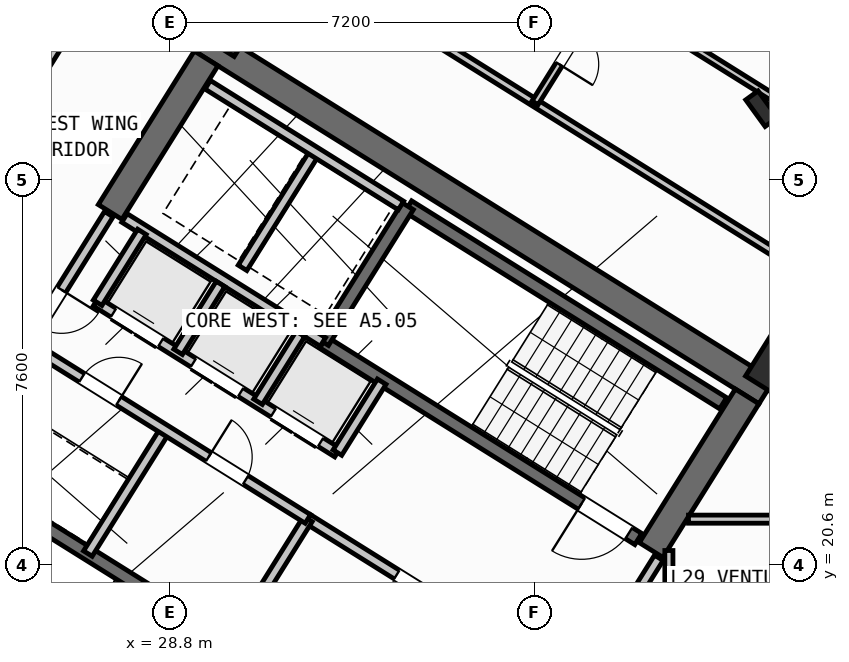
"""IFC4 building model, lengths in metres.
Left out: names, types, materials, properties, quantities, classifications, styles, units other than length and angle.
Written with IfcOpenShell. Run it as: python <this file> out.ifc"""

import sys

from ifc_helpers import new_model, si_unit, direction, frame, frame_2d, origin, origin_2d, place, context, subcontext, project, spatial, rectangle, hollow_rectangle, i_section, extrude, source, transform, mapped, element, fill, save


model = new_model("IFC4")
c1 = context("Model", 3, precision=1e-05, world=origin(), true_north=direction((0.0, 1.0)))
c2 = subcontext(c1, "Body", "Model", "MODEL_VIEW")
j1 = project(units=[si_unit("LENGTHUNIT", "METRE"), si_unit("PLANEANGLEUNIT", "RADIAN")], contexts=[c1])
p1 = place(None, origin())
s1 = spatial("IfcSite", under=j1, at=p1, CompositionType="ELEMENT")
p2 = place(p1, origin())
s2 = spatial("IfcBuilding", under=s1, at=p2, CompositionType="ELEMENT")
p3 = place(p2, frame((0.0, 0.0, 116.1)))
s3 = spatial("IfcBuildingStorey", under=s2, at=p3, CompositionType="ELEMENT", Elevation=116.1)
p4 = place(p3, frame((40.573, 24.01, 0.0), z_axis=(0.0, 0.0, 1.0), x_axis=(-0.848047359947, 0.529920442413, 0.0)))
e1 = element("IfcWall", 1, at=p4, inside=s3, PredefinedType="SHEAR", context=c2, shape_type="SweptSolid", body=[
    extrude(rectangle(XDim=13.14, YDim=0.55, at=frame_2d((6.57, 0.0))), origin(), (0.0, 0.0, 1.0), 3.35),
])
p5 = place(p3, frame((40.194, 23.922, 0.0), z_axis=(0.0, 0.0, 1.0), x_axis=(-0.529888438328, -0.848067357541, 0.0)))
e2 = element("IfcWall", 2, at=p5, inside=s3, PredefinedType="SHEAR", context=c2, shape_type="SweptSolid", body=[
    extrude(rectangle(XDim=3.575, YDim=0.55, at=frame_2d((1.788, 0.0))), origin(), (0.0, 0.0, 1.0), 3.35),
])
p6 = place(p3, frame((29.517, 30.594, 0.0), z_axis=(0.0, 0.0, 1.0), x_axis=(-0.529906864564, -0.848055844204, 0.0)))
e3 = element("IfcWall", 3, at=p6, inside=s3, PredefinedType="SHEAR", context=c2, shape_type="SweptSolid", body=[
    extrude(rectangle(XDim=3.575, YDim=0.55, at=frame_2d((1.788, 0.0))), origin(), (0.0, 0.0, 1.0), 3.35),
])
m1 = source(origin(), c2, "Body", "SweptSolid", [
    extrude(hollow_rectangle(XDim=0.9, YDim=0.9, WallThickness=0.036, at=origin_2d()), origin(), (0.0, 0.0, 1.0), 3.6),
])
for number, where, z_axis, x_axis in (
    (4, (40.783, 24.469, 0.0), (0.0, 0.0, 1.0), (-0.848, 0.53, 0.0)),
    (5, (29.928, 31.251, 0.0), (0.0, 0.0, 1.0), (-0.848, 0.53, 0.0)),
):
    element("IfcColumn", number, at=place(p3, frame(where, z_axis=z_axis, x_axis=x_axis)), inside=s3, PredefinedType="COLUMN", context=c2, shape_type="MappedRepresentation", body=[
        mapped(m1, transform((0.0, 0.0, 0.0), scale=1.0)),
    ])
m2 = source(origin(), c2, "Body", "SweptSolid", [
    extrude(i_section(OverallWidth=0.3, OverallDepth=0.65, WebThickness=0.016, FlangeThickness=0.031, at=origin_2d()), origin(), (0.0, 0.0, 1.0), 3.6),
])
p7 = place(p3, frame((40.479, 29.601, 0.0), z_axis=(0.0, 0.0, 1.0), x_axis=(0.809016994375, 0.587785252292, 0.0)))
e6 = element("IfcColumn", 6, at=p7, inside=s3, PredefinedType="COLUMN", context=c2, shape_type="MappedRepresentation", body=[
    mapped(m2, transform((0.0, 0.0, 0.0), scale=1.0)),
])
p8 = place(p3, frame((31.76, 12.183, 0.0), z_axis=(0.0, 0.0, 1.0), x_axis=(-0.848047074256, 0.529920899612, 0.0)))
e7 = element("IfcWall", 7, at=p8, inside=s3, PredefinedType="STANDARD", context=c2, shape_type="SweptSolid", body=[
    extrude(rectangle(XDim=30.652, YDim=0.32, at=frame_2d((15.326, 0.0))), origin(), (0.0, 0.0, 1.0), 3.35),
])
p9 = place(p8, frame((15.153, 0.0, 0.0)))
e8 = element("IfcOpeningElement", 8, at=p9, cuts=e7, PredefinedType="OPENING", context=c2, shape_type="SweptSolid", body=[
    extrude(rectangle(XDim=1.2, YDim=2.15, at=frame_2d((0.6, 1.075))), frame((0.0, 0.17, 0.0), z_axis=(0.0, -1.0, 0.0), x_axis=(1.0, 0.0, 0.0)), (0.0, 0.0, 1.0), 0.34),
])
p10 = place(p8, frame((2.002, 0.0, 0.8)))
e9 = element("IfcOpeningElement", 9, at=p10, cuts=e7, PredefinedType="OPENING", context=c2, shape_type="SweptSolid", body=[
    extrude(rectangle(XDim=2.1, YDim=1.55, at=frame_2d((1.05, 0.775))), frame((0.0, 0.17, 0.0), z_axis=(0.0, -1.0, 0.0), x_axis=(1.0, 0.0, 0.0)), (0.0, 0.0, 1.0), 0.34),
])
p11 = place(p8, frame((7.206, 0.0, 0.8)))
e10 = element("IfcOpeningElement", 10, at=p11, cuts=e7, PredefinedType="OPENING", context=c2, shape_type="SweptSolid", body=[
    extrude(rectangle(XDim=2.1, YDim=1.55, at=frame_2d((1.05, 0.775))), frame((0.0, 0.17, 0.0), z_axis=(0.0, -1.0, 0.0), x_axis=(1.0, 0.0, 0.0)), (0.0, 0.0, 1.0), 0.34),
])
p12 = place(p8, frame((12.648, 0.0, 1.0)))
e11 = element("IfcOpeningElement", 11, at=p12, cuts=e7, PredefinedType="OPENING", context=c2, shape_type="SweptSolid", body=[
    extrude(rectangle(XDim=0.9, YDim=1.25, at=frame_2d((0.45, 0.625))), frame((0.0, 0.17, 0.0), z_axis=(0.0, -1.0, 0.0), x_axis=(1.0, 0.0, 0.0)), (0.0, 0.0, 1.0), 0.34),
])
p13 = place(p8, frame((19.458, 0.0, 0.95)))
e12 = element("IfcOpeningElement", 12, at=p13, cuts=e7, PredefinedType="OPENING", context=c2, shape_type="SweptSolid", body=[
    extrude(rectangle(XDim=1.2, YDim=1.4, at=frame_2d((0.6, 0.7))), frame((0.0, 0.17, 0.0), z_axis=(0.0, -1.0, 0.0), x_axis=(1.0, 0.0, 0.0)), (0.0, 0.0, 1.0), 0.34),
])
p14 = place(p8, frame((21.858, 0.0, 0.95)))
e13 = element("IfcOpeningElement", 13, at=p14, cuts=e7, PredefinedType="OPENING", context=c2, shape_type="SweptSolid", body=[
    extrude(rectangle(XDim=1.2, YDim=1.4, at=frame_2d((0.6, 0.7))), frame((0.0, 0.17, 0.0), z_axis=(0.0, -1.0, 0.0), x_axis=(1.0, 0.0, 0.0)), (0.0, 0.0, 1.0), 0.34),
])
p15 = place(p8, frame((27.266, 0.0, 0.8)))
e14 = element("IfcOpeningElement", 14, at=p15, cuts=e7, PredefinedType="OPENING", context=c2, shape_type="SweptSolid", body=[
    extrude(rectangle(XDim=2.1, YDim=1.55, at=frame_2d((1.05, 0.775))), frame((0.0, 0.17, 0.0), z_axis=(0.0, -1.0, 0.0), x_axis=(1.0, 0.0, 0.0)), (0.0, 0.0, 1.0), 0.34),
])
p16 = place(p3, frame((31.28, 18.261, 0.0), z_axis=(0.0, 0.0, 1.0), x_axis=(-0.848051618787, 0.529913626805, 0.0)))
e15 = element("IfcWall", 15, at=p16, inside=s3, PredefinedType="SHEAR", context=c2, shape_type="SweptSolid", body=[
    extrude(rectangle(XDim=7.46, YDim=0.26, at=frame_2d((3.73, 0.0))), origin(), (0.0, 0.0, 1.0), 3.35),
])
p17 = place(p16, frame((0.36, 0.0, 0.0)))
e16 = element("IfcOpeningElement", 16, at=p17, cuts=e15, PredefinedType="OPENING", context=c2, shape_type="SweptSolid", body=[
    extrude(rectangle(XDim=0.86, YDim=2.05, at=frame_2d((0.43, 1.025))), frame((0.0, 0.14, 0.0), z_axis=(0.0, -1.0, 0.0), x_axis=(1.0, 0.0, 0.0)), (0.0, 0.0, 1.0), 0.28),
])
p18 = place(p3, frame((39.721, 23.788, 0.0), z_axis=(0.0, 0.0, 1.0), x_axis=(-0.848054434086, 0.529909121291, 0.0)))
e17 = element("IfcWall", 17, at=p18, inside=s3, PredefinedType="SHEAR", context=c2, shape_type="SweptSolid", body=[
    extrude(rectangle(XDim=7.33, YDim=0.26, at=frame_2d((3.665, 0.0))), origin(), (0.0, 0.0, 1.0), 3.35),
])
p19 = place(p3, frame((38.046, 21.108, 0.0), z_axis=(0.0, 0.0, 1.0), x_axis=(-0.848054434086, 0.529909121291, 0.0)))
e18 = element("IfcWall", 18, at=p19, inside=s3, PredefinedType="SHEAR", context=c2, shape_type="SweptSolid", body=[
    extrude(rectangle(XDim=7.33, YDim=0.26, at=frame_2d((3.665, 0.0))), origin(), (0.0, 0.0, 1.0), 3.35),
])
p20 = place(p19, frame((0.22, 0.0, 0.0)))
e19 = element("IfcOpeningElement", 19, at=p20, cuts=e18, PredefinedType="OPENING", context=c2, shape_type="SweptSolid", body=[
    extrude(rectangle(XDim=1.1, YDim=2.1, at=frame_2d((0.55, 1.05))), frame((0.0, 0.14, 0.0), z_axis=(0.0, -1.0, 0.0), x_axis=(1.0, 0.0, 0.0)), (0.0, 0.0, 1.0), 0.28),
])
p21 = place(p3, frame((33.496, 27.677, 0.0), z_axis=(0.0, 0.0, 1.0), x_axis=(-0.529908658664, -0.84805472316, 0.0)))
e20 = element("IfcWall", 20, at=p21, inside=s3, PredefinedType="SHEAR", context=c2, shape_type="SweptSolid", body=[
    extrude(rectangle(XDim=3.16, YDim=0.26, at=frame_2d((1.58, 0.0))), origin(), (0.0, 0.0, 1.0), 3.35),
])
p22 = place(p3, frame((36.417, 18.447, 0.0), z_axis=(0.0, 0.0, 1.0), x_axis=(-0.848064879198, 0.529892404805, 0.0)))
e21 = element("IfcWall", 21, at=p22, inside=s3, PredefinedType="STANDARD", context=c2, shape_type="SweptSolid", body=[
    extrude(rectangle(XDim=5.768, YDim=0.2, at=frame_2d((2.884, 0.0))), origin(), (0.0, 0.0, 1.0), 3.34),
])
p23 = place(p22, frame((2.548, 0.0, 0.0)))
e22 = element("IfcOpeningElement", 22, at=p23, cuts=e21, PredefinedType="OPENING", context=c2, shape_type="SweptSolid", body=[
    extrude(rectangle(XDim=1.15, YDim=2.1, at=frame_2d((0.575, 1.05))), frame((0.0, 0.11, 0.0), z_axis=(0.0, -1.0, 0.0), x_axis=(1.0, 0.0, 0.0)), (0.0, 0.0, 1.0), 0.22),
])
p24 = place(p3, frame((31.822, 24.998, 0.0), z_axis=(0.0, 0.0, 1.0), x_axis=(-0.848036912365, 0.52993716162, 0.0)))
e23 = element("IfcWall", 23, at=p24, inside=s3, PredefinedType="STANDARD", context=c2, shape_type="SweptSolid", body=[
    extrude(rectangle(XDim=4.618, YDim=0.2, at=frame_2d((2.309, 0.0))), origin(), (0.0, 0.0, 1.0), 3.34),
])
p25 = place(p3, frame((32.108, 22.814, 0.0), z_axis=(0.0, 0.0, 1.0), x_axis=(-0.848042229521, 0.529928652696, 0.0)))
e24 = element("IfcWall", 24, at=p25, inside=s3, PredefinedType="STANDARD", context=c2, shape_type="SweptSolid", body=[
    extrude(rectangle(XDim=5.62, YDim=0.2, at=frame_2d((2.81, 0.0))), origin(), (0.0, 0.0, 1.0), 3.34),
])
p26 = place(p25, frame((0.39, 0.0, 0.0)))
e25 = element("IfcOpeningElement", 25, at=p26, cuts=e24, PredefinedType="OPENING", context=c2, shape_type="SweptSolid", body=[
    extrude(rectangle(XDim=1.1, YDim=2.15, at=frame_2d((0.55, 1.075))), frame((0.0, 0.11, 0.0), z_axis=(0.0, -1.0, 0.0), x_axis=(1.0, 0.0, 0.0)), (0.0, 0.0, 1.0), 0.22),
])
p27 = place(p25, frame((2.25, 0.0, 0.0)))
e26 = element("IfcOpeningElement", 26, at=p27, cuts=e24, PredefinedType="OPENING", context=c2, shape_type="SweptSolid", body=[
    extrude(rectangle(XDim=1.1, YDim=2.15, at=frame_2d((0.55, 1.075))), frame((0.0, 0.11, 0.0), z_axis=(0.0, -1.0, 0.0), x_axis=(1.0, 0.0, 0.0)), (0.0, 0.0, 1.0), 0.22),
])
p28 = place(p25, frame((4.11, 0.0, 0.0)))
e27 = element("IfcOpeningElement", 27, at=p28, cuts=e24, PredefinedType="OPENING", context=c2, shape_type="SweptSolid", body=[
    extrude(rectangle(XDim=1.1, YDim=2.15, at=frame_2d((0.55, 1.075))), frame((0.0, 0.11, 0.0), z_axis=(0.0, -1.0, 0.0), x_axis=(1.0, 0.0, 0.0)), (0.0, 0.0, 1.0), 0.22),
])
p29 = place(p3, frame((32.982, 24.213, 0.0), z_axis=(0.0, 0.0, 1.0), x_axis=(-0.529839334948, -0.84809803628, 0.0)))
e28 = element("IfcWall", 28, at=p29, inside=s3, PredefinedType="STANDARD", context=c2, shape_type="SweptSolid", body=[
    extrude(rectangle(XDim=1.65, YDim=0.2, at=frame_2d((0.825, 0.0))), origin(), (0.0, 0.0, 1.0), 3.34),
])
p30 = place(p3, frame((28.25, 27.17, 0.0), z_axis=(0.0, 0.0, 1.0), x_axis=(-0.529905827651, -0.848056492117, 0.0)))
e29 = element("IfcWall", 29, at=p30, inside=s3, PredefinedType="STANDARD", context=c2, shape_type="SweptSolid", body=[
    extrude(rectangle(XDim=1.65, YDim=0.2, at=frame_2d((0.825, 0.0))), origin(), (0.0, 0.0, 1.0), 3.34),
])
p31 = place(p3, frame((31.645, 28.716, 0.0), z_axis=(0.0, 0.0, 1.0), x_axis=(-0.52986693015, -0.848080795876, 0.0)))
e30 = element("IfcWall", 30, at=p31, inside=s3, PredefinedType="STANDARD", context=c2, shape_type="SweptSolid", body=[
    extrude(rectangle(XDim=2.66, YDim=0.2, at=frame_2d((1.33, 0.0))), origin(), (0.0, 0.0, 1.0), 3.34),
])
p32 = place(p3, frame((33.363, 27.69, 0.0), z_axis=(0.0, 0.0, 1.0), x_axis=(-0.848047090064, 0.529920874315, 0.0)))
e31 = element("IfcWall", 31, at=p32, inside=s3, PredefinedType="STANDARD", context=c2, shape_type="SweptSolid", body=[
    extrude(rectangle(XDim=4.498, YDim=0.2, at=frame_2d((2.249, 0.0))), origin(), (0.0, 0.0, 1.0), 3.34),
])
for number, where, z_axis, x_axis in (
    (32, (31.379, 25.156, 0.0), (0.0, 0.0, 1.0), (-0.53, -0.848, 0.0)),
    (33, (29.801, 26.142, 0.0), (0.0, 0.0, 1.0), (-0.53, -0.848, 0.0)),
):
    element("IfcWall", number, at=place(p3, frame(where, z_axis=z_axis, x_axis=x_axis)), inside=s3, PredefinedType="STANDARD", context=c2, shape_type="SweptSolid", body=[
        extrude(rectangle(XDim=1.58, YDim=0.2, at=frame_2d((0.79, 0.0))), origin(), (0.0, 0.0, 1.0), 3.34),
    ])
for number, where, z_axis, x_axis in (
    (34, (31.525, 21.504, 0.0), (0.0, 0.0, 1.0), (-0.53, -0.848, 0.0)),
    (35, (28.71, 23.263, 0.0), (0.0, 0.0, 1.0), (-0.53, -0.848, 0.0)),
):
    element("IfcWall", number, at=place(p3, frame(where, z_axis=z_axis, x_axis=x_axis)), inside=s3, PredefinedType="STANDARD", context=c2, shape_type="SweptSolid", body=[
        extrude(rectangle(XDim=2.88, YDim=0.2, at=frame_2d((1.44, 0.0))), origin(), (0.0, 0.0, 1.0), 3.34),
    ])
p33 = place(p3, frame((31.525, 21.504, 0.0), z_axis=(0.0, 0.0, 1.0), x_axis=(-0.848040211232, 0.529931882541, 0.0)))
e36 = element("IfcWall", 36, at=p33, inside=s3, PredefinedType="STANDARD", context=c2, shape_type="SweptSolid", body=[
    extrude(rectangle(XDim=6.218, YDim=0.2, at=frame_2d((3.109, 0.0))), origin(), (0.0, 0.0, 1.0), 3.34),
])
p34 = place(p33, frame((4.4, 0.0, 0.0)))
e37 = element("IfcOpeningElement", 37, at=p34, cuts=e36, PredefinedType="OPENING", context=c2, shape_type="SweptSolid", body=[
    extrude(rectangle(XDim=0.86, YDim=2.05, at=frame_2d((0.43, 1.025))), frame((0.0, 0.11, 0.0), z_axis=(0.0, -1.0, 0.0), x_axis=(1.0, 0.0, 0.0)), (0.0, 0.0, 1.0), 0.22),
])
p35 = place(p33, frame((1.45, 0.0, 0.0)))
e38 = element("IfcOpeningElement", 38, at=p35, cuts=e36, PredefinedType="OPENING", context=c2, shape_type="SweptSolid", body=[
    extrude(rectangle(XDim=0.86, YDim=2.05, at=frame_2d((0.43, 1.025))), frame((0.0, 0.11, 0.0), z_axis=(0.0, -1.0, 0.0), x_axis=(1.0, 0.0, 0.0)), (0.0, 0.0, 1.0), 0.22),
])
p36 = place(p3, frame((27.596, 27.52, 0.0), z_axis=(0.0, 0.0, 1.0), x_axis=(-0.529865479138, -0.848081702443, 0.0)))
e39 = element("IfcWall", 39, at=p36, inside=s3, PredefinedType="STANDARD", context=c2, shape_type="SweptSolid", body=[
    extrude(rectangle(XDim=2.96, YDim=0.2, at=frame_2d((1.48, 0.0))), origin(), (0.0, 0.0, 1.0), 3.34),
])
p37 = place(p36, frame((1.76, 0.0, 0.0)))
e40 = element("IfcOpeningElement", 40, at=p37, cuts=e39, PredefinedType="OPENING", context=c2, shape_type="SweptSolid", body=[
    extrude(rectangle(XDim=0.86, YDim=2.05, at=frame_2d((0.43, 1.025))), frame((0.0, 0.11, 0.0), z_axis=(0.0, -1.0, 0.0), x_axis=(1.0, 0.0, 0.0)), (0.0, 0.0, 1.0), 0.22),
])
p38 = place(p3, frame((31.239, 38.274, 0.0), z_axis=(0.0, 0.0, 1.0), x_axis=(-0.529920220799, -0.848047498427, 0.0)))
e41 = element("IfcWall", 41, at=p38, inside=s3, PredefinedType="PARTITIONING", context=c2, shape_type="SweptSolid", body=[
    extrude(rectangle(XDim=9.2, YDim=0.16, at=frame_2d((4.6, 0.0))), origin(), (0.0, 0.0, 1.0), 3.34),
])
p39 = place(p3, frame((41.936, 26.012, 0.0), z_axis=(0.0, 0.0, 1.0), x_axis=(-0.848051154596, 0.529914369676, 0.0)))
e42 = element("IfcWall", 42, at=p39, inside=s3, PredefinedType="PARTITIONING", context=c2, shape_type="SweptSolid", body=[
    extrude(rectangle(XDim=15.57, YDim=0.16, at=frame_2d((7.785, 0.0))), origin(), (0.0, 0.0, 1.0), 3.34),
])
p40 = place(p39, frame((10.83, 0.0, 0.0)))
e43 = element("IfcOpeningElement", 43, at=p40, cuts=e42, PredefinedType="OPENING", context=c2, shape_type="SweptSolid", body=[
    extrude(rectangle(XDim=1.0, YDim=2.1, at=frame_2d((0.5, 1.05))), frame((0.0, 0.09, 0.0), z_axis=(0.0, -1.0, 0.0), x_axis=(1.0, 0.0, 0.0)), (0.0, 0.0, 1.0), 0.18),
])
p41 = place(p3, frame((42.226, 28.873, 0.0), z_axis=(0.0, 0.0, 1.0), x_axis=(-0.848049134363, 0.529917602752, 0.0)))
e44 = element("IfcWall", 44, at=p41, inside=s3, PredefinedType="PLUMBINGWALL", context=c2, shape_type="SweptSolid", body=[
    extrude(rectangle(XDim=14.3, YDim=0.14, at=frame_2d((7.15, 0.0))), origin(), (0.0, 0.0, 1.0), 3.34),
])
p42 = place(p41, frame((9.57, 0.0, 0.0)))
e45 = element("IfcOpeningElement", 45, at=p42, cuts=e44, PredefinedType="OPENING", context=c2, shape_type="SweptSolid", body=[
    extrude(rectangle(XDim=0.92, YDim=2.08, at=frame_2d((0.46, 1.04))), frame((0.0, 0.08, 0.0), z_axis=(0.0, -1.0, 0.0), x_axis=(1.0, 0.0, 0.0)), (0.0, 0.0, 1.0), 0.16),
])
p43 = place(p3, frame((37.375, 31.904, 0.0), z_axis=(0.0, 0.0, 1.0), x_axis=(-0.529913878929, -0.848051461244, 0.0)))
e46 = element("IfcWall", 46, at=p43, inside=s3, PredefinedType="PLUMBINGWALL", context=c2, shape_type="SweptSolid", body=[
    extrude(rectangle(XDim=2.58, YDim=0.14, at=frame_2d((1.29, 0.0))), origin(), (0.0, 0.0, 1.0), 3.34),
])
p44 = place(p43, frame((0.9, 0.0, 0.0)))
e47 = element("IfcOpeningElement", 47, at=p44, cuts=e46, PredefinedType="OPENING", context=c2, shape_type="SweptSolid", body=[
    extrude(rectangle(XDim=0.78, YDim=2.05, at=frame_2d((0.39, 1.025))), frame((0.0, 0.08, 0.0), z_axis=(0.0, -1.0, 0.0), x_axis=(1.0, 0.0, 0.0)), (0.0, 0.0, 1.0), 0.16),
])
p45 = place(p3, frame((38.451, 20.737, 0.0), z_axis=(0.0, 0.0, 1.0), x_axis=(-0.529924799939, -0.848044637038, 0.0)))
e48 = element("IfcWall", 48, at=p45, inside=s3, PredefinedType="STANDARD", context=c2, shape_type="SweptSolid", body=[
    extrude(rectangle(XDim=2.96, YDim=0.2, at=frame_2d((1.48, 0.0))), origin(), (0.0, 0.0, 1.0), 3.34),
])
p46 = place(p45, frame((1.46, 0.0, 0.0)))
e49 = element("IfcOpeningElement", 49, at=p46, cuts=e48, PredefinedType="OPENING", context=c2, shape_type="SweptSolid", body=[
    extrude(rectangle(XDim=0.86, YDim=2.05, at=frame_2d((0.43, 1.025))), frame((0.0, 0.11, 0.0), z_axis=(0.0, -1.0, 0.0), x_axis=(1.0, 0.0, 0.0)), (0.0, 0.0, 1.0), 0.22),
])
p47 = place(p3, frame((38.65, 17.93, 0.0), z_axis=(0.0, 0.0, 1.0), x_axis=(0.0, 1.0, 0.0)))
e50 = element("IfcWall", 50, at=p47, inside=s3, PredefinedType="PARTITIONING", context=c2, shape_type="SweptSolid", body=[
    extrude(rectangle(XDim=2.951, YDim=0.16, at=frame_2d((1.476, 0.0))), origin(), (0.0, 0.0, 1.0), 3.34),
])
p48 = place(p3, frame((39.037, 21.5, 0.0), z_axis=(0.0, 0.0, 1.0), x_axis=(1.0, 0.0, 0.0)))
e51 = element("IfcWall", 51, at=p48, inside=s3, PredefinedType="PARTITIONING", context=c2, shape_type="SweptSolid", body=[
    extrude(rectangle(XDim=7.215, YDim=0.16, at=frame_2d((3.607, 0.0))), origin(), (0.0, 0.0, 1.0), 3.34),
])
m3 = source(origin(), c2, "Body", "SweptSolid", [
    extrude(rectangle(XDim=1.1, YDim=2.1, at=frame_2d((0.55, 1.05))), frame((0.0, 0.025, 0.0), z_axis=(0.0, -1.0, 0.0), x_axis=(1.0, 0.0, 0.0)), (0.0, 0.0, 1.0), 0.05),
])
p49 = place(p20, origin())
e52 = element("IfcDoor", 52, at=p49, inside=s3, OperationType="SINGLE_SWING_RIGHT", PredefinedType="DOOR", context=c2, shape_type="MappedRepresentation", body=[
    mapped(m3, transform((0.0, 0.0, 0.0), scale=1.0)),
])
fill(e19, e52)
m4 = source(origin(), c2, "Body", "SweptSolid", [
    extrude(rectangle(XDim=1.15, YDim=2.1, at=frame_2d((0.575, 1.05))), frame((0.0, 0.025, 0.0), z_axis=(0.0, -1.0, 0.0), x_axis=(1.0, 0.0, 0.0)), (0.0, 0.0, 1.0), 0.05),
])
p50 = place(p23, origin())
e53 = element("IfcDoor", 53, at=p50, inside=s3, OperationType="SINGLE_SWING_LEFT", PredefinedType="DOOR", context=c2, shape_type="MappedRepresentation", body=[
    mapped(m4, transform((0.0, 0.0, 0.0), scale=1.0)),
])
fill(e22, e53)
m5 = source(origin(), c2, "Body", "SweptSolid", [
    extrude(rectangle(XDim=1.1, YDim=2.15, at=frame_2d((0.55, 1.075))), frame((0.0, 0.025, 0.0), z_axis=(0.0, -1.0, 0.0), x_axis=(1.0, 0.0, 0.0)), (0.0, 0.0, 1.0), 0.05),
])
p51 = place(p26, origin())
e54 = element("IfcDoor", 54, at=p51, inside=s3, OperationType="DOUBLE_DOOR_SLIDING", PredefinedType="DOOR", context=c2, shape_type="MappedRepresentation", body=[
    mapped(m5, transform((0.0, 0.0, 0.0), scale=1.0)),
])
fill(e25, e54)
p52 = place(p27, origin())
e55 = element("IfcDoor", 55, at=p52, inside=s3, OperationType="DOUBLE_DOOR_SLIDING", PredefinedType="DOOR", context=c2, shape_type="MappedRepresentation", body=[
    mapped(m5, transform((0.0, 0.0, 0.0), scale=1.0)),
])
fill(e26, e55)
p53 = place(p28, origin())
e56 = element("IfcDoor", 56, at=p53, inside=s3, OperationType="DOUBLE_DOOR_SLIDING", PredefinedType="DOOR", context=c2, shape_type="MappedRepresentation", body=[
    mapped(m5, transform((0.0, 0.0, 0.0), scale=1.0)),
])
fill(e27, e56)
m6 = source(origin(), c2, "Body", "SweptSolid", [
    extrude(rectangle(XDim=0.86, YDim=2.05, at=frame_2d((0.43, 1.025))), frame((0.0, 0.025, 0.0), z_axis=(0.0, -1.0, 0.0), x_axis=(1.0, 0.0, 0.0)), (0.0, 0.0, 1.0), 0.05),
])
p54 = place(p34, frame((0.86, 0.0, 0.0), z_axis=(0.0, 0.0, 1.0), x_axis=(-1.0, 0.0, 0.0)))
e57 = element("IfcDoor", 57, at=p54, inside=s3, OperationType="SINGLE_SWING_RIGHT", PredefinedType="DOOR", context=c2, shape_type="MappedRepresentation", body=[
    mapped(m6, transform((0.0, 0.0, 0.0), scale=1.0)),
])
fill(e37, e57)
p55 = place(p35, frame((0.86, 0.0, 0.0), z_axis=(0.0, 0.0, 1.0), x_axis=(-1.0, 0.0, 0.0)))
e58 = element("IfcDoor", 58, at=p55, inside=s3, OperationType="SINGLE_SWING_LEFT", PredefinedType="DOOR", context=c2, shape_type="MappedRepresentation", body=[
    mapped(m6, transform((0.0, 0.0, 0.0), scale=1.0)),
])
fill(e38, e58)
p56 = place(p37, origin())
e59 = element("IfcDoor", 59, at=p56, inside=s3, OperationType="SINGLE_SWING_LEFT", PredefinedType="DOOR", context=c2, shape_type="MappedRepresentation", body=[
    mapped(m6, transform((0.0, 0.0, 0.0), scale=1.0)),
])
fill(e40, e59)
m7 = source(origin(), c2, "Body", "SweptSolid", [
    extrude(rectangle(XDim=0.78, YDim=2.05, at=frame_2d((0.39, 1.025))), frame((0.0, 0.025, 0.0), z_axis=(0.0, -1.0, 0.0), x_axis=(1.0, 0.0, 0.0)), (0.0, 0.0, 1.0), 0.05),
])
p57 = place(p44, origin())
e60 = element("IfcDoor", 60, at=p57, inside=s3, OperationType="SINGLE_SWING_RIGHT", PredefinedType="DOOR", context=c2, shape_type="MappedRepresentation", body=[
    mapped(m7, transform((0.0, 0.0, 0.0), scale=1.0)),
])
fill(e47, e60)
save(model, sys.argv[1])
